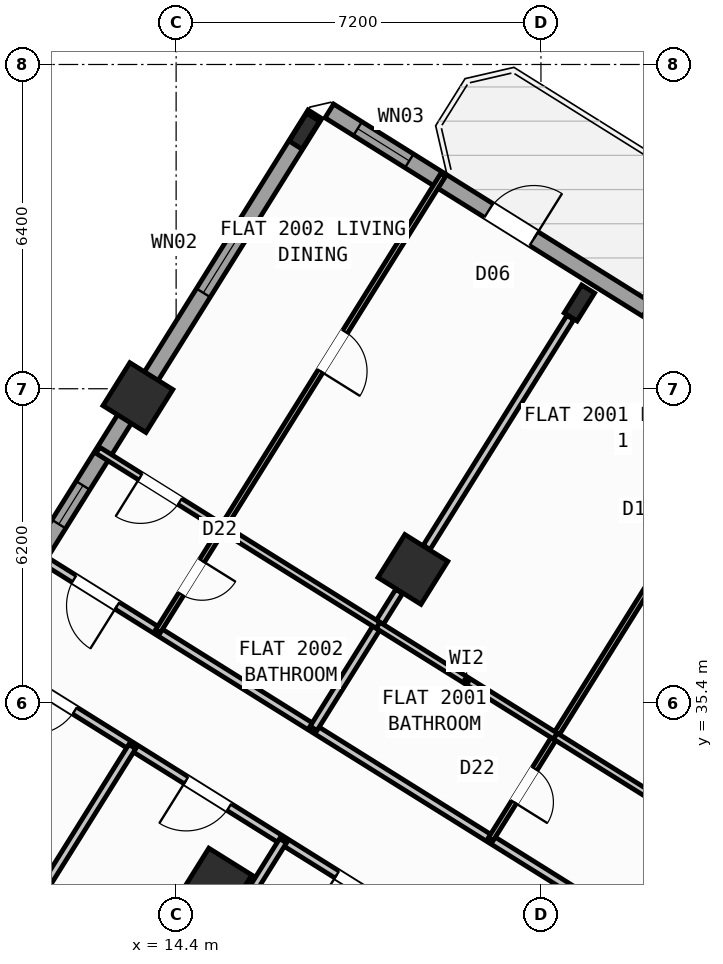
"""IFC4 building model, lengths in metres.
Left out: names, types, materials, properties, quantities, classifications, styles, units other than length and angle.
Written with IfcOpenShell. Run it as: python <this file> out.ifc"""

import sys

from ifc_helpers import new_model, si_unit, direction, frame, frame_2d, origin, origin_2d, place, context, subcontext, project, spatial, rectangle, hollow_rectangle, i_section, extrude, source, transform, mapped, element, fill, save


model = new_model("IFC4")
c1 = context("Model", 3, precision=1e-05, world=origin(), true_north=direction((0.0, 1.0)))
c2 = subcontext(c1, "Body", "Model", "MODEL_VIEW")
j1 = project(units=[si_unit("LENGTHUNIT", "METRE"), si_unit("PLANEANGLEUNIT", "RADIAN")], contexts=[c1])
p1 = place(None, origin())
s1 = spatial("IfcSite", under=j1, at=p1, CompositionType="ELEMENT")
p2 = place(p1, origin())
s2 = spatial("IfcBuilding", under=s1, at=p2, CompositionType="ELEMENT")
p3 = place(p2, frame((0.0, 0.0, 81.0)))
s3 = spatial("IfcBuildingStorey", under=s2, at=p3, CompositionType="ELEMENT", Elevation=81.0)
m1 = source(origin(), c2, "Body", "SweptSolid", [
    extrude(i_section(OverallWidth=0.3, OverallDepth=0.65, WebThickness=0.016, FlangeThickness=0.031, at=origin_2d()), origin(), (0.0, 0.0, 1.0), 3.6),
])
p4 = place(p3, frame((22.358, 43.292, 0.0), z_axis=(0.0, 0.0, 1.0), x_axis=(-0.848048096156, 0.529919264233, 0.0)))
e1 = element("IfcColumn", 1, at=p4, inside=s3, PredefinedType="COLUMN", context=c2, shape_type="MappedRepresentation", body=[
    mapped(m1, transform((0.0, 0.0, 0.0), scale=1.0)),
])
m2 = source(origin(), c2, "Body", "SweptSolid", [
    extrude(hollow_rectangle(XDim=1.0, YDim=1.0, WallThickness=0.04, at=origin_2d()), origin(), (0.0, 0.0, 1.0), 3.6),
])
for number, where, z_axis, x_axis in (
    (2, (19.073, 38.034, 0.0), (0.0, 0.0, 1.0), (-0.848, 0.53, 0.0)),
    (3, (15.205, 31.844, 0.0), (0.0, 0.0, 1.0), (-0.848, 0.53, 0.0)),
):
    element("IfcColumn", number, at=place(p3, frame(where, z_axis=z_axis, x_axis=x_axis)), inside=s3, PredefinedType="COLUMN", context=c2, shape_type="MappedRepresentation", body=[
        mapped(m2, transform((0.0, 0.0, 0.0), scale=1.0)),
    ])
p5 = place(p3, frame((16.931, 46.684, 0.0), z_axis=(0.0, 0.0, 1.0), x_axis=(-0.848048096156, 0.529919264233, 0.0)))
e4 = element("IfcColumn", 4, at=p5, inside=s3, PredefinedType="COLUMN", context=c2, shape_type="MappedRepresentation", body=[
    mapped(m1, transform((0.0, 0.0, 0.0), scale=1.0)),
])
p6 = place(p3, frame((13.646, 41.426, 0.0), z_axis=(0.0, 0.0, 1.0), x_axis=(-0.848048096156, 0.529919264233, 0.0)))
e5 = element("IfcColumn", 5, at=p6, inside=s3, PredefinedType="COLUMN", context=c2, shape_type="MappedRepresentation", body=[
    mapped(m2, transform((0.0, 0.0, 0.0), scale=1.0)),
])
p7 = place(p3, frame((5.7, 28.71, 0.0), z_axis=(0.0, 0.0, 1.0), x_axis=(0.529923711467, 0.8480453172, 0.0)))
e6 = element("IfcWall", 6, at=p7, inside=s3, PredefinedType="STANDARD", context=c2, shape_type="SweptSolid", body=[
    extrude(rectangle(XDim=21.587, YDim=0.32, at=frame_2d((10.794, 0.0))), origin(), (0.0, 0.0, 1.0), 2.745),
])
p8 = place(p7, frame((2.994, 0.0, 0.8)))
e7 = element("IfcOpeningElement", 7, at=p8, cuts=e6, PredefinedType="OPENING", context=c2, shape_type="SweptSolid", body=[
    extrude(rectangle(XDim=2.1, YDim=1.55, at=frame_2d((1.05, 0.775))), frame((0.0, 0.17, 0.0), z_axis=(0.0, -1.0, 0.0), x_axis=(1.0, 0.0, 0.0)), (0.0, 0.0, 1.0), 0.34),
])
p9 = place(p7, frame((12.049, 0.0, 1.0)))
e8 = element("IfcOpeningElement", 8, at=p9, cuts=e6, PredefinedType="OPENING", context=c2, shape_type="SweptSolid", body=[
    extrude(rectangle(XDim=0.9, YDim=1.25, at=frame_2d((0.45, 0.625))), frame((0.0, 0.17, 0.0), z_axis=(0.0, -1.0, 0.0), x_axis=(1.0, 0.0, 0.0)), (0.0, 0.0, 1.0), 0.34),
])
p10 = place(p7, frame((17.431, 0.0, 0.85)))
e9 = element("IfcOpeningElement", 9, at=p10, cuts=e6, PredefinedType="OPENING", context=c2, shape_type="SweptSolid", body=[
    extrude(rectangle(XDim=1.5, YDim=1.5, at=frame_2d((0.75, 0.75))), frame((0.0, 0.17, 0.0), z_axis=(0.0, -1.0, 0.0), x_axis=(1.0, 0.0, 0.0)), (0.0, 0.0, 1.0), 0.34),
])
p11 = place(p3, frame((17.424, 47.083, 0.0), z_axis=(0.0, 0.0, 1.0), x_axis=(0.848049927979, -0.529916332693, 0.0)))
e10 = element("IfcWall", 10, at=p11, inside=s3, PredefinedType="STANDARD", context=c2, shape_type="SweptSolid", body=[
    extrude(rectangle(XDim=29.223, YDim=0.32, at=frame_2d((14.612, 0.0))), origin(), (0.0, 0.0, 1.0), 3.32),
])
p12 = place(p11, frame((3.709, 0.0, 0.0)))
e11 = element("IfcOpeningElement", 11, at=p12, cuts=e10, PredefinedType="OPENING", context=c2, shape_type="SweptSolid", body=[
    extrude(rectangle(XDim=1.05, YDim=2.15, at=frame_2d((0.525, 1.075))), frame((0.0, 0.17, 0.0), z_axis=(0.0, -1.0, 0.0), x_axis=(1.0, 0.0, 0.0)), (0.0, 0.0, 1.0), 0.34),
])
p13 = place(p11, frame((0.659, 0.0, 0.95)))
e12 = element("IfcOpeningElement", 12, at=p13, cuts=e10, PredefinedType="OPENING", context=c2, shape_type="SweptSolid", body=[
    extrude(rectangle(XDim=1.2, YDim=1.4, at=frame_2d((0.6, 0.7))), frame((0.0, 0.17, 0.0), z_axis=(0.0, -1.0, 0.0), x_axis=(1.0, 0.0, 0.0)), (0.0, 0.0, 1.0), 0.34),
])
p14 = place(p11, frame((7.369, 0.0, 0.85)))
e13 = element("IfcOpeningElement", 13, at=p14, cuts=e10, PredefinedType="OPENING", context=c2, shape_type="SweptSolid", body=[
    extrude(rectangle(XDim=1.8, YDim=1.5, at=frame_2d((0.9, 0.75))), frame((0.0, 0.17, 0.0), z_axis=(0.0, -1.0, 0.0), x_axis=(1.0, 0.0, 0.0)), (0.0, 0.0, 1.0), 0.34),
])
p15 = place(p11, frame((11.009, 0.0, 1.0)))
e14 = element("IfcOpeningElement", 14, at=p15, cuts=e10, PredefinedType="OPENING", context=c2, shape_type="SweptSolid", body=[
    extrude(rectangle(XDim=0.9, YDim=1.25, at=frame_2d((0.45, 0.625))), frame((0.0, 0.17, 0.0), z_axis=(0.0, -1.0, 0.0), x_axis=(1.0, 0.0, 0.0)), (0.0, 0.0, 1.0), 0.34),
])
p16 = place(p11, frame((13.874, 0.0, 0.95)))
e15 = element("IfcOpeningElement", 15, at=p16, cuts=e10, PredefinedType="OPENING", context=c2, shape_type="SweptSolid", body=[
    extrude(rectangle(XDim=1.2, YDim=1.4, at=frame_2d((0.6, 0.7))), frame((0.0, 0.17, 0.0), z_axis=(0.0, -1.0, 0.0), x_axis=(1.0, 0.0, 0.0)), (0.0, 0.0, 1.0), 0.34),
])
p17 = place(p11, frame((17.254, 0.0, 1.0)))
e16 = element("IfcOpeningElement", 16, at=p17, cuts=e10, PredefinedType="OPENING", context=c2, shape_type="SweptSolid", body=[
    extrude(rectangle(XDim=0.9, YDim=1.25, at=frame_2d((0.45, 0.625))), frame((0.0, 0.17, 0.0), z_axis=(0.0, -1.0, 0.0), x_axis=(1.0, 0.0, 0.0)), (0.0, 0.0, 1.0), 0.34),
])
p18 = place(p11, frame((20.764, 0.0, 0.8)))
e17 = element("IfcOpeningElement", 17, at=p18, cuts=e10, PredefinedType="OPENING", context=c2, shape_type="SweptSolid", body=[
    extrude(rectangle(XDim=2.1, YDim=1.55, at=frame_2d((1.05, 0.775))), frame((0.0, 0.17, 0.0), z_axis=(0.0, -1.0, 0.0), x_axis=(1.0, 0.0, 0.0)), (0.0, 0.0, 1.0), 0.34),
])
p19 = place(p11, frame((25.403, 0.0, 0.8)))
e18 = element("IfcOpeningElement", 18, at=p19, cuts=e10, PredefinedType="OPENING", context=c2, shape_type="SweptSolid", body=[
    extrude(rectangle(XDim=2.1, YDim=1.55, at=frame_2d((1.05, 0.775))), frame((0.0, 0.17, 0.0), z_axis=(0.0, -1.0, 0.0), x_axis=(1.0, 0.0, 0.0)), (0.0, 0.0, 1.0), 0.34),
])
p20 = place(p3, frame((25.754, 29.497, 0.0), z_axis=(0.0, 0.0, 1.0), x_axis=(-0.848045850158, 0.529922858565, 0.0)))
e19 = element("IfcWall", 19, at=p20, inside=s3, PredefinedType="PARTITIONING", context=c2, shape_type="SweptSolid", body=[
    extrude(rectangle(XDim=16.73, YDim=0.16, at=frame_2d((8.365, 0.0))), origin(), (0.0, 0.0, 1.0), 3.31),
])
p21 = place(p20, frame((2.532, 0.0, 0.0)))
e20 = element("IfcOpeningElement", 20, at=p21, cuts=e19, PredefinedType="OPENING", context=c2, shape_type="SweptSolid", body=[
    extrude(rectangle(XDim=1.0, YDim=2.1, at=frame_2d((0.5, 1.05))), frame((0.0, 0.09, 0.0), z_axis=(0.0, -1.0, 0.0), x_axis=(1.0, 0.0, 0.0)), (0.0, 0.0, 1.0), 0.18),
])
p22 = place(p20, frame((14.76, 0.0, 0.0)))
e21 = element("IfcOpeningElement", 21, at=p22, cuts=e19, PredefinedType="OPENING", context=c2, shape_type="SweptSolid", body=[
    extrude(rectangle(XDim=1.0, YDim=2.1, at=frame_2d((0.5, 1.05))), frame((0.0, 0.09, 0.0), z_axis=(0.0, -1.0, 0.0), x_axis=(1.0, 0.0, 0.0)), (0.0, 0.0, 1.0), 0.18),
])
p23 = place(p3, frame((24.588, 27.631, 0.0), z_axis=(0.0, 0.0, 1.0), x_axis=(-0.848041752158, 0.529929416617, 0.0)))
e22 = element("IfcWall", 22, at=p23, inside=s3, PredefinedType="PARTITIONING", context=c2, shape_type="SweptSolid", body=[
    extrude(rectangle(XDim=16.73, YDim=0.16, at=frame_2d((8.365, 0.0))), origin(), (0.0, 0.0, 1.0), 3.31),
])
p24 = place(p23, frame((0.92, 0.0, 0.0)))
e23 = element("IfcOpeningElement", 23, at=p24, cuts=e22, PredefinedType="OPENING", context=c2, shape_type="SweptSolid", body=[
    extrude(rectangle(XDim=1.0, YDim=2.1, at=frame_2d((0.5, 1.05))), frame((0.0, 0.09, 0.0), z_axis=(0.0, -1.0, 0.0), x_axis=(1.0, 0.0, 0.0)), (0.0, 0.0, 1.0), 0.18),
])
p25 = place(p23, frame((4.408, 0.0, 0.0)))
e24 = element("IfcOpeningElement", 24, at=p25, cuts=e22, PredefinedType="OPENING", context=c2, shape_type="SweptSolid", body=[
    extrude(rectangle(XDim=1.0, YDim=2.1, at=frame_2d((0.5, 1.05))), frame((0.0, 0.09, 0.0), z_axis=(0.0, -1.0, 0.0), x_axis=(1.0, 0.0, 0.0)), (0.0, 0.0, 1.0), 0.18),
])
p26 = place(p23, frame((7.271, 0.0, 0.0)))
e25 = element("IfcOpeningElement", 25, at=p26, cuts=e22, PredefinedType="OPENING", context=c2, shape_type="SweptSolid", body=[
    extrude(rectangle(XDim=1.0, YDim=2.1, at=frame_2d((0.5, 1.05))), frame((0.0, 0.09, 0.0), z_axis=(0.0, -1.0, 0.0), x_axis=(1.0, 0.0, 0.0)), (0.0, 0.0, 1.0), 0.18),
])
p27 = place(p23, frame((10.78, 0.0, 0.0)))
e26 = element("IfcOpeningElement", 26, at=p27, cuts=e22, PredefinedType="OPENING", context=c2, shape_type="SweptSolid", body=[
    extrude(rectangle(XDim=1.0, YDim=2.1, at=frame_2d((0.5, 1.05))), frame((0.0, 0.09, 0.0), z_axis=(0.0, -1.0, 0.0), x_axis=(1.0, 0.0, 0.0)), (0.0, 0.0, 1.0), 0.18),
])
p28 = place(p23, frame((14.372, 0.0, 0.0)))
e27 = element("IfcOpeningElement", 27, at=p28, cuts=e22, PredefinedType="OPENING", context=c2, shape_type="SweptSolid", body=[
    extrude(rectangle(XDim=1.0, YDim=2.1, at=frame_2d((0.5, 1.05))), frame((0.0, 0.09, 0.0), z_axis=(0.0, -1.0, 0.0), x_axis=(1.0, 0.0, 0.0)), (0.0, 0.0, 1.0), 0.18),
])
p29 = place(p3, frame((16.51, 32.678, 0.0), z_axis=(0.0, 0.0, 1.0), x_axis=(-0.529903001606, -0.848058257957, 0.0)))
e28 = element("IfcWall", 28, at=p29, inside=s3, PredefinedType="PARTITIONING", context=c2, shape_type="SweptSolid", body=[
    extrude(rectangle(XDim=9.15, YDim=0.16, at=frame_2d((4.575, 0.0))), origin(), (0.0, 0.0, 1.0), 3.31),
])
p30 = place(p3, frame((13.535, 34.538, 0.0), z_axis=(0.0, 0.0, 1.0), x_axis=(-0.529934181779, -0.848038774457, 0.0)))
e29 = element("IfcWall", 29, at=p30, inside=s3, PredefinedType="PARTITIONING", context=c2, shape_type="SweptSolid", body=[
    extrude(rectangle(XDim=9.15, YDim=0.16, at=frame_2d((4.575, 0.0))), origin(), (0.0, 0.0, 1.0), 3.31),
])
p31 = place(p3, frame((22.18, 43.006, 0.0), z_axis=(0.0, 0.0, 1.0), x_axis=(-0.529937421401, -0.848036750028, 0.0)))
e30 = element("IfcWall", 30, at=p31, inside=s3, PredefinedType="PARTITIONING", context=c2, shape_type="SweptSolid", body=[
    extrude(rectangle(XDim=5.351, YDim=0.16, at=frame_2d((2.676, 0.0))), origin(), (0.0, 0.0, 1.0), 2.745),
])
p32 = place(p3, frame((18.802, 37.6, 0.0), z_axis=(0.0, 0.0, 1.0), x_axis=(-0.529875025416, -0.848075738033, 0.0)))
e31 = element("IfcWall", 31, at=p32, inside=s3, PredefinedType="PARTITIONING", context=c2, shape_type="SweptSolid", body=[
    extrude(rectangle(XDim=3.188, YDim=0.16, at=frame_2d((1.594, 0.0))), origin(), (0.0, 0.0, 1.0), 2.745),
])
p33 = place(p3, frame((26.238, 41.717, 0.0), z_axis=(0.0, 0.0, 1.0), x_axis=(-0.529939012684, -0.848035755635, 0.0)))
e32 = element("IfcWall", 32, at=p33, inside=s3, PredefinedType="PARTITIONING", context=c2, shape_type="SweptSolid", body=[
    extrude(rectangle(XDim=10.62, YDim=0.11, at=frame_2d((5.31, 0.0))), origin(), (0.0, 0.0, 1.0), 2.935),
])
p34 = place(p33, frame((8.98, 0.0, 0.0)))
e33 = element("IfcOpeningElement", 33, at=p34, cuts=e32, PredefinedType="OPENING", context=c2, shape_type="SweptSolid", body=[
    extrude(rectangle(XDim=0.78, YDim=2.05, at=frame_2d((0.39, 1.025))), frame((0.0, 0.065, 0.0), z_axis=(0.0, -1.0, 0.0), x_axis=(1.0, 0.0, 0.0)), (0.0, 0.0, 1.0), 0.13),
])
p35 = place(p33, frame((3.65, 0.0, 0.0)))
e34 = element("IfcOpeningElement", 34, at=p35, cuts=e32, PredefinedType="OPENING", context=c2, shape_type="SweptSolid", body=[
    extrude(rectangle(XDim=0.92, YDim=2.08, at=frame_2d((0.46, 1.04))), frame((0.0, 0.065, 0.0), z_axis=(0.0, -1.0, 0.0), x_axis=(1.0, 0.0, 0.0)), (0.0, 0.0, 1.0), 0.13),
])
p36 = place(p3, frame((27.026, 31.532, 0.0), z_axis=(0.0, 0.0, 1.0), x_axis=(-0.8480503147, 0.529915713804, 0.0)))
e35 = element("IfcWall", 35, at=p36, inside=s3, PredefinedType="PLUMBINGWALL", context=c2, shape_type="SweptSolid", body=[
    extrude(rectangle(XDim=6.065, YDim=0.14, at=frame_2d((3.032, 0.0))), origin(), (0.0, 0.0, 1.0), 3.31),
])
p37 = place(p36, frame((1.272, 0.0, 0.0)))
e36 = element("IfcOpeningElement", 36, at=p37, cuts=e35, PredefinedType="OPENING", context=c2, shape_type="SweptSolid", body=[
    extrude(rectangle(XDim=0.92, YDim=2.08, at=frame_2d((0.46, 1.04))), frame((0.0, 0.08, 0.0), z_axis=(0.0, -1.0, 0.0), x_axis=(1.0, 0.0, 0.0)), (0.0, 0.0, 1.0), 0.16),
])
p38 = place(p3, frame((21.882, 34.746, 0.0), z_axis=(0.0, 0.0, 1.0), x_axis=(-0.848041525148, 0.529929779899, 0.0)))
e37 = element("IfcWall", 37, at=p38, inside=s3, PredefinedType="PLUMBINGWALL", context=c2, shape_type="SweptSolid", body=[
    extrude(rectangle(XDim=4.125, YDim=0.14, at=frame_2d((2.062, 0.0))), origin(), (0.0, 0.0, 1.0), 3.31),
])
p39 = place(p3, frame((19.67, 45.821, 0.0), z_axis=(0.0, 0.0, 1.0), x_axis=(-0.529922479612, -0.848046086956, 0.0)))
e38 = element("IfcWall", 38, at=p39, inside=s3, PredefinedType="PARTITIONING", context=c2, shape_type="SweptSolid", body=[
    extrude(rectangle(XDim=10.62, YDim=0.11, at=frame_2d((5.31, 0.0))), origin(), (0.0, 0.0, 1.0), 3.31),
])
p40 = place(p39, frame((8.98, 0.0, 0.0)))
e39 = element("IfcOpeningElement", 39, at=p40, cuts=e38, PredefinedType="OPENING", context=c2, shape_type="SweptSolid", body=[
    extrude(rectangle(XDim=0.78, YDim=2.05, at=frame_2d((0.39, 1.025))), frame((0.0, 0.065, 0.0), z_axis=(0.0, -1.0, 0.0), x_axis=(1.0, 0.0, 0.0)), (0.0, 0.0, 1.0), 0.13),
])
p41 = place(p39, frame((3.65, 0.0, 0.0)))
e40 = element("IfcOpeningElement", 40, at=p41, cuts=e38, PredefinedType="OPENING", context=c2, shape_type="SweptSolid", body=[
    extrude(rectangle(XDim=0.92, YDim=2.08, at=frame_2d((0.46, 1.04))), frame((0.0, 0.065, 0.0), z_axis=(0.0, -1.0, 0.0), x_axis=(1.0, 0.0, 0.0)), (0.0, 0.0, 1.0), 0.13),
])
p42 = place(p3, frame((15.314, 38.85, 0.0), z_axis=(0.0, 0.0, 1.0), x_axis=(-0.848045593671, 0.529923269025, 0.0)))
e41 = element("IfcWall", 41, at=p42, inside=s3, PredefinedType="PLUMBINGWALL", context=c2, shape_type="SweptSolid", body=[
    extrude(rectangle(XDim=2.9, YDim=0.14, at=frame_2d((1.45, 0.0))), origin(), (0.0, 0.0, 1.0), 3.31),
])
p43 = place(p42, frame((0.99, 0.0, 0.0)))
e42 = element("IfcOpeningElement", 42, at=p43, cuts=e41, PredefinedType="OPENING", context=c2, shape_type="SweptSolid", body=[
    extrude(rectangle(XDim=0.92, YDim=2.08, at=frame_2d((0.46, 1.04))), frame((0.0, 0.08, 0.0), z_axis=(0.0, -1.0, 0.0), x_axis=(1.0, 0.0, 0.0)), (0.0, 0.0, 1.0), 0.16),
])
p44 = place(p3, frame((18.384, 36.932, 0.0), z_axis=(0.0, 0.0, 1.0), x_axis=(-0.848051346257, 0.52991406295, 0.0)))
e43 = element("IfcWall", 43, at=p44, inside=s3, PredefinedType="PLUMBINGWALL", context=c2, shape_type="SweptSolid", body=[
    extrude(rectangle(XDim=3.62, YDim=0.14, at=frame_2d((1.81, 0.0))), origin(), (0.0, 0.0, 1.0), 3.31),
])
m3 = source(origin(), c2, "Body", "SweptSolid", [
    extrude(rectangle(XDim=1.05, YDim=2.15, at=frame_2d((0.525, 1.075))), frame((0.0, 0.025, 0.0), z_axis=(0.0, -1.0, 0.0), x_axis=(1.0, 0.0, 0.0)), (0.0, 0.0, 1.0), 0.05),
])
p45 = place(p12, origin())
e44 = element("IfcDoor", 44, at=p45, inside=s3, OperationType="SINGLE_SWING_RIGHT", PredefinedType="DOOR", context=c2, shape_type="MappedRepresentation", body=[
    mapped(m3, transform((0.0, 0.0, 0.0), scale=1.0)),
])
fill(e11, e44)
m4 = source(origin(), c2, "Body", "SweptSolid", [
    extrude(rectangle(XDim=0.9, YDim=1.25, at=frame_2d((0.45, 0.625))), frame((0.0, 0.03, 0.0), z_axis=(0.0, -1.0, 0.0), x_axis=(1.0, 0.0, 0.0)), (0.0, 0.0, 1.0), 0.06),
])
p46 = place(p9, origin())
e45 = element("IfcWindow", 45, at=p46, inside=s3, PartitioningType="SINGLE_PANEL", PredefinedType="WINDOW", context=c2, shape_type="MappedRepresentation", body=[
    mapped(m4, transform((0.0, 0.0, 0.0), scale=1.0)),
])
fill(e8, e45)
m5 = source(origin(), c2, "Body", "SweptSolid", [
    extrude(rectangle(XDim=1.5, YDim=1.5, at=frame_2d((0.75, 0.75))), frame((0.0, 0.03, 0.0), z_axis=(0.0, -1.0, 0.0), x_axis=(1.0, 0.0, 0.0)), (0.0, 0.0, 1.0), 0.06),
])
p47 = place(p10, origin())
e46 = element("IfcWindow", 46, at=p47, inside=s3, PartitioningType="SINGLE_PANEL", PredefinedType="WINDOW", context=c2, shape_type="MappedRepresentation", body=[
    mapped(m5, transform((0.0, 0.0, 0.0), scale=1.0)),
])
fill(e9, e46)
m6 = source(origin(), c2, "Body", "SweptSolid", [
    extrude(rectangle(XDim=1.2, YDim=1.4, at=frame_2d((0.6, 0.7))), frame((0.0, 0.03, 0.0), z_axis=(0.0, -1.0, 0.0), x_axis=(1.0, 0.0, 0.0)), (0.0, 0.0, 1.0), 0.06),
])
p48 = place(p13, origin())
e47 = element("IfcWindow", 47, at=p48, inside=s3, PartitioningType="SINGLE_PANEL", PredefinedType="WINDOW", context=c2, shape_type="MappedRepresentation", body=[
    mapped(m6, transform((0.0, 0.0, 0.0), scale=1.0)),
])
fill(e12, e47)
m7 = source(origin(), c2, "Body", "SweptSolid", [
    extrude(rectangle(XDim=1.0, YDim=2.1, at=frame_2d((0.5, 1.05))), frame((0.0, 0.025, 0.0), z_axis=(0.0, -1.0, 0.0), x_axis=(1.0, 0.0, 0.0)), (0.0, 0.0, 1.0), 0.05),
])
p49 = place(p26, origin())
e48 = element("IfcDoor", 48, at=p49, inside=s3, OperationType="SINGLE_SWING_RIGHT", PredefinedType="DOOR", context=c2, shape_type="MappedRepresentation", body=[
    mapped(m7, transform((0.0, 0.0, 0.0), scale=1.0)),
])
fill(e25, e48)
p50 = place(p27, origin())
e49 = element("IfcDoor", 49, at=p50, inside=s3, OperationType="SINGLE_SWING_RIGHT", PredefinedType="DOOR", context=c2, shape_type="MappedRepresentation", body=[
    mapped(m7, transform((0.0, 0.0, 0.0), scale=1.0)),
])
fill(e26, e49)
p51 = place(p28, origin())
e50 = element("IfcDoor", 50, at=p51, inside=s3, OperationType="SINGLE_SWING_RIGHT", PredefinedType="DOOR", context=c2, shape_type="MappedRepresentation", body=[
    mapped(m7, transform((0.0, 0.0, 0.0), scale=1.0)),
])
fill(e27, e50)
m8 = source(origin(), c2, "Body", "SweptSolid", [
    extrude(rectangle(XDim=0.78, YDim=2.05, at=frame_2d((0.39, 1.025))), frame((0.0, 0.025, 0.0), z_axis=(0.0, -1.0, 0.0), x_axis=(1.0, 0.0, 0.0)), (0.0, 0.0, 1.0), 0.05),
])
p52 = place(p34, origin())
e51 = element("IfcDoor", 51, at=p52, inside=s3, OperationType="SINGLE_SWING_RIGHT", PredefinedType="DOOR", context=c2, shape_type="MappedRepresentation", body=[
    mapped(m8, transform((0.0, 0.0, 0.0), scale=1.0)),
])
fill(e33, e51)
p53 = place(p22, origin())
e52 = element("IfcDoor", 52, at=p53, inside=s3, OperationType="SINGLE_SWING_LEFT", PredefinedType="DOOR", context=c2, shape_type="MappedRepresentation", body=[
    mapped(m7, transform((0.0, 0.0, 0.0), scale=1.0)),
])
fill(e21, e52)
m9 = source(origin(), c2, "Body", "SweptSolid", [
    extrude(rectangle(XDim=0.92, YDim=2.08, at=frame_2d((0.46, 1.04))), frame((0.0, 0.025, 0.0), z_axis=(0.0, -1.0, 0.0), x_axis=(1.0, 0.0, 0.0)), (0.0, 0.0, 1.0), 0.05),
])
p54 = place(p43, origin())
e53 = element("IfcDoor", 53, at=p54, inside=s3, OperationType="SINGLE_SWING_RIGHT", PredefinedType="DOOR", context=c2, shape_type="MappedRepresentation", body=[
    mapped(m9, transform((0.0, 0.0, 0.0), scale=1.0)),
])
fill(e42, e53)
p55 = place(p40, origin())
e54 = element("IfcDoor", 54, at=p55, inside=s3, OperationType="SINGLE_SWING_LEFT", PredefinedType="DOOR", context=c2, shape_type="MappedRepresentation", body=[
    mapped(m8, transform((0.0, 0.0, 0.0), scale=1.0)),
])
fill(e39, e54)
p56 = place(p41, origin())
e55 = element("IfcDoor", 55, at=p56, inside=s3, OperationType="SINGLE_SWING_RIGHT", PredefinedType="DOOR", context=c2, shape_type="MappedRepresentation", body=[
    mapped(m9, transform((0.0, 0.0, 0.0), scale=1.0)),
])
fill(e40, e55)
save(model, sys.argv[1])
